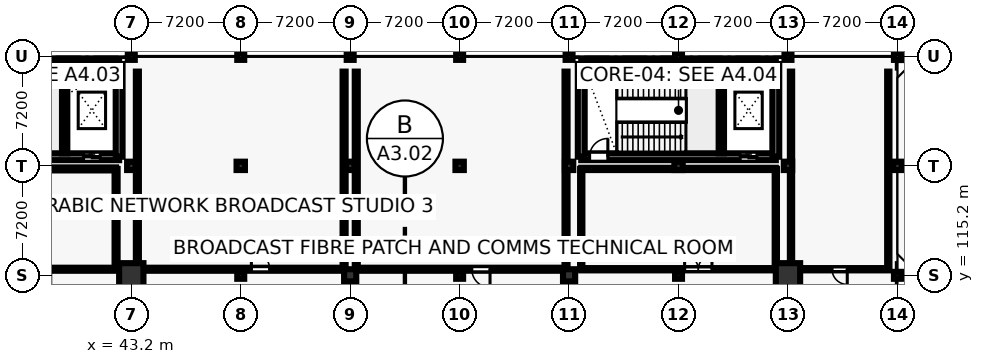
"""IFC4 building model, lengths in metres.
Left out: names, types, materials, properties, quantities, classifications, styles, units other than length and angle.
Written with IfcOpenShell. Run it as: python <this file> out.ifc"""

import sys

from ifc_helpers import new_model, si_unit, direction, frame, frame_2d, origin, origin_2d, place, context, subcontext, project, spatial, rectangle, circle, hollow_circle, extrude, element, fill, save


model = new_model("IFC4")
c1 = context("Model", 3, precision=1e-05, world=origin(), true_north=direction((0.0, 1.0)))
c2 = subcontext(c1, "Body", "Model", "MODEL_VIEW")
j1 = project(units=[si_unit("LENGTHUNIT", "METRE"), si_unit("PLANEANGLEUNIT", "RADIAN")], contexts=[c1])
p1 = place(None, origin())
s1 = spatial("IfcSite", under=j1, at=p1, CompositionType="ELEMENT")
p2 = place(p1, origin())
s2 = spatial("IfcBuilding", under=s1, at=p2, CompositionType="ELEMENT")
p3 = place(p2, frame((0.0, 0.0, 18.6)))
s3 = spatial("IfcBuildingStorey", under=s2, at=p3, CompositionType="ELEMENT", Elevation=18.6)
p4 = place(p3, frame((43.2, 115.2, 0.0), z_axis=(0.0, 0.0, 1.0), x_axis=(1.0, 0.0, 0.0)))
e1 = element("IfcColumn", 1, at=p4, inside=s3, PredefinedType="COLUMN", context=c2, shape_type="SweptSolid", body=[
    extrude(circle(Radius=0.8, at=origin_2d()), origin(), (0.0, 0.0, 1.0), 4.4),
])
p5 = place(p3, frame((43.2, 122.4, 0.0), z_axis=(0.0, 0.0, 1.0), x_axis=(1.0, 0.0, 0.0)))
e2 = element("IfcColumn", 2, at=p5, inside=s3, PredefinedType="COLUMN", context=c2, shape_type="SweptSolid", body=[
    extrude(rectangle(XDim=0.55, YDim=0.55, at=origin_2d()), origin(), (0.0, 0.0, 1.0), 4.4),
])
for number, where, z_axis, x_axis in (
    (3, (43.2, 129.6, 0.0), (0.0, 0.0, 1.0), (1.0, 0.0, 0.0)),
    (4, (50.4, 115.2, 0.0), (0.0, 0.0, 1.0), (1.0, 0.0, 0.0)),
):
    element("IfcColumn", number, at=place(p3, frame(where, z_axis=z_axis, x_axis=x_axis)), inside=s3, PredefinedType="COLUMN", context=c2, shape_type="SweptSolid", body=[
        extrude(hollow_circle(Radius=0.229, WallThickness=0.02, at=origin_2d()), origin(), (0.0, 0.0, 1.0), 4.4),
    ])
p6 = place(p3, frame((50.4, 122.4, 0.0), z_axis=(0.0, 0.0, 1.0), x_axis=(1.0, 0.0, 0.0)))
e5 = element("IfcColumn", 5, at=p6, inside=s3, PredefinedType="COLUMN", context=c2, shape_type="SweptSolid", body=[
    extrude(rectangle(XDim=0.55, YDim=0.55, at=origin_2d()), origin(), (0.0, 0.0, 1.0), 4.4),
])
p7 = place(p3, frame((50.4, 129.6, 0.0), z_axis=(0.0, 0.0, 1.0), x_axis=(1.0, 0.0, 0.0)))
e6 = element("IfcColumn", 6, at=p7, inside=s3, PredefinedType="COLUMN", context=c2, shape_type="SweptSolid", body=[
    extrude(hollow_circle(Radius=0.229, WallThickness=0.02, at=origin_2d()), origin(), (0.0, 0.0, 1.0), 4.4),
])
p8 = place(p3, frame((57.6, 115.2, 0.0), z_axis=(0.0, 0.0, 1.0), x_axis=(1.0, 0.0, 0.0)))
e7 = element("IfcColumn", 7, at=p8, inside=s3, PredefinedType="COLUMN", context=c2, shape_type="SweptSolid", body=[
    extrude(circle(Radius=0.4, at=origin_2d()), origin(), (0.0, 0.0, 1.0), 4.4),
])
p9 = place(p3, frame((57.6, 122.4, 0.0), z_axis=(0.0, 0.0, 1.0), x_axis=(1.0, 0.0, 0.0)))
e8 = element("IfcColumn", 8, at=p9, inside=s3, PredefinedType="COLUMN", context=c2, shape_type="SweptSolid", body=[
    extrude(rectangle(XDim=0.55, YDim=0.55, at=origin_2d()), origin(), (0.0, 0.0, 1.0), 4.4),
])
for number, where, z_axis, x_axis in (
    (9, (57.6, 129.6, 0.0), (0.0, 0.0, 1.0), (1.0, 0.0, 0.0)),
    (10, (64.8, 115.2, 0.0), (0.0, 0.0, 1.0), (1.0, 0.0, 0.0)),
):
    element("IfcColumn", number, at=place(p3, frame(where, z_axis=z_axis, x_axis=x_axis)), inside=s3, PredefinedType="COLUMN", context=c2, shape_type="SweptSolid", body=[
        extrude(hollow_circle(Radius=0.229, WallThickness=0.02, at=origin_2d()), origin(), (0.0, 0.0, 1.0), 4.4),
    ])
p10 = place(p3, frame((64.8, 122.4, 0.0), z_axis=(0.0, 0.0, 1.0), x_axis=(1.0, 0.0, 0.0)))
e11 = element("IfcColumn", 11, at=p10, inside=s3, PredefinedType="COLUMN", context=c2, shape_type="SweptSolid", body=[
    extrude(rectangle(XDim=0.55, YDim=0.55, at=origin_2d()), origin(), (0.0, 0.0, 1.0), 4.4),
])
p11 = place(p3, frame((64.8, 129.6, 0.0), z_axis=(0.0, 0.0, 1.0), x_axis=(1.0, 0.0, 0.0)))
e12 = element("IfcColumn", 12, at=p11, inside=s3, PredefinedType="COLUMN", context=c2, shape_type="SweptSolid", body=[
    extrude(hollow_circle(Radius=0.229, WallThickness=0.02, at=origin_2d()), origin(), (0.0, 0.0, 1.0), 4.4),
])
p12 = place(p3, frame((72.0, 115.2, 0.0), z_axis=(0.0, 0.0, 1.0), x_axis=(1.0, 0.0, 0.0)))
e13 = element("IfcColumn", 13, at=p12, inside=s3, PredefinedType="COLUMN", context=c2, shape_type="SweptSolid", body=[
    extrude(circle(Radius=0.4, at=origin_2d()), origin(), (0.0, 0.0, 1.0), 4.4),
])
p13 = place(p3, frame((72.0, 122.4, 0.0), z_axis=(0.0, 0.0, 1.0), x_axis=(1.0, 0.0, 0.0)))
e14 = element("IfcColumn", 14, at=p13, inside=s3, PredefinedType="COLUMN", context=c2, shape_type="SweptSolid", body=[
    extrude(rectangle(XDim=0.55, YDim=0.55, at=origin_2d()), origin(), (0.0, 0.0, 1.0), 4.4),
])
for number, where, z_axis, x_axis in (
    (15, (72.0, 129.6, 0.0), (0.0, 0.0, 1.0), (1.0, 0.0, 0.0)),
    (16, (79.2, 115.2, 0.0), (0.0, 0.0, 1.0), (1.0, 0.0, 0.0)),
):
    element("IfcColumn", number, at=place(p3, frame(where, z_axis=z_axis, x_axis=x_axis)), inside=s3, PredefinedType="COLUMN", context=c2, shape_type="SweptSolid", body=[
        extrude(hollow_circle(Radius=0.229, WallThickness=0.02, at=origin_2d()), origin(), (0.0, 0.0, 1.0), 4.4),
    ])
p14 = place(p3, frame((79.2, 122.4, 0.0), z_axis=(0.0, 0.0, 1.0), x_axis=(1.0, 0.0, 0.0)))
e17 = element("IfcColumn", 17, at=p14, inside=s3, PredefinedType="COLUMN", context=c2, shape_type="SweptSolid", body=[
    extrude(rectangle(XDim=0.55, YDim=0.55, at=origin_2d()), origin(), (0.0, 0.0, 1.0), 4.4),
])
p15 = place(p3, frame((79.2, 129.6, 0.0), z_axis=(0.0, 0.0, 1.0), x_axis=(1.0, 0.0, 0.0)))
e18 = element("IfcColumn", 18, at=p15, inside=s3, PredefinedType="COLUMN", context=c2, shape_type="SweptSolid", body=[
    extrude(hollow_circle(Radius=0.229, WallThickness=0.02, at=origin_2d()), origin(), (0.0, 0.0, 1.0), 4.4),
])
p16 = place(p3, frame((86.4, 115.2, 0.0), z_axis=(0.0, 0.0, 1.0), x_axis=(1.0, 0.0, 0.0)))
e19 = element("IfcColumn", 19, at=p16, inside=s3, PredefinedType="COLUMN", context=c2, shape_type="SweptSolid", body=[
    extrude(circle(Radius=0.8, at=origin_2d()), origin(), (0.0, 0.0, 1.0), 4.4),
])
p17 = place(p3, frame((86.4, 122.4, 0.0), z_axis=(0.0, 0.0, 1.0), x_axis=(1.0, 0.0, 0.0)))
e20 = element("IfcColumn", 20, at=p17, inside=s3, PredefinedType="COLUMN", context=c2, shape_type="SweptSolid", body=[
    extrude(rectangle(XDim=0.55, YDim=0.55, at=origin_2d()), origin(), (0.0, 0.0, 1.0), 4.4),
])
for number, where, z_axis, x_axis in (
    (21, (86.4, 129.6, 0.0), (0.0, 0.0, 1.0), (1.0, 0.0, 0.0)),
    (22, (93.6, 115.2, 0.0), (0.0, 0.0, 1.0), (1.0, 0.0, 0.0)),
):
    element("IfcColumn", number, at=place(p3, frame(where, z_axis=z_axis, x_axis=x_axis)), inside=s3, PredefinedType="COLUMN", context=c2, shape_type="SweptSolid", body=[
        extrude(hollow_circle(Radius=0.229, WallThickness=0.02, at=origin_2d()), origin(), (0.0, 0.0, 1.0), 4.4),
    ])
p18 = place(p3, frame((93.6, 122.4, 0.0), z_axis=(0.0, 0.0, 1.0), x_axis=(1.0, 0.0, 0.0)))
e23 = element("IfcColumn", 23, at=p18, inside=s3, PredefinedType="COLUMN", context=c2, shape_type="SweptSolid", body=[
    extrude(rectangle(XDim=0.55, YDim=0.55, at=origin_2d()), origin(), (0.0, 0.0, 1.0), 4.4),
])
p19 = place(p3, frame((93.6, 129.6, 0.0), z_axis=(0.0, 0.0, 1.0), x_axis=(1.0, 0.0, 0.0)))
e24 = element("IfcColumn", 24, at=p19, inside=s3, PredefinedType="COLUMN", context=c2, shape_type="SweptSolid", body=[
    extrude(hollow_circle(Radius=0.229, WallThickness=0.02, at=origin_2d()), origin(), (0.0, 0.0, 1.0), 4.4),
])
p20 = place(p3, frame((29.6, 123.0, 0.0), z_axis=(0.0, 0.0, 1.0), x_axis=(1.0, 0.0, 0.0)))
e25 = element("IfcWall", 25, at=p20, inside=s3, PredefinedType="SHEAR", context=c2, shape_type="SweptSolid", body=[
    extrude(rectangle(XDim=12.8, YDim=0.45, at=frame_2d((6.4, 0.0))), origin(), (0.0, 0.0, 1.0), 4.15),
])
p21 = place(p20, frame((0.55, 0.0, 0.0)))
e26 = element("IfcOpeningElement", 26, at=p21, cuts=e25, PredefinedType="OPENING", context=c2, shape_type="SweptSolid", body=[
    extrude(rectangle(XDim=1.2, YDim=2.25, at=frame_2d((0.6, 1.125))), frame((0.0, 0.235, 0.0), z_axis=(0.0, -1.0, 0.0), x_axis=(1.0, 0.0, 0.0)), (0.0, 0.0, 1.0), 0.47),
])
p22 = place(p20, frame((10.458, 0.0, 0.0)))
e27 = element("IfcOpeningElement", 27, at=p22, cuts=e25, PredefinedType="OPENING", context=c2, shape_type="SweptSolid", body=[
    extrude(rectangle(XDim=1.1, YDim=2.2, at=frame_2d((0.55, 1.1))), frame((0.0, 0.235, 0.0), z_axis=(0.0, -1.0, 0.0), x_axis=(1.0, 0.0, 0.0)), (0.0, 0.0, 1.0), 0.47),
])
p23 = place(p3, frame((29.6, 129.1, 0.0), z_axis=(0.0, 0.0, 1.0), x_axis=(1.0, 0.0, 0.0)))
e28 = element("IfcWall", 28, at=p23, inside=s3, PredefinedType="SHEAR", context=c2, shape_type="SweptSolid", body=[
    extrude(rectangle(XDim=12.8, YDim=0.45, at=frame_2d((6.4, 0.0))), origin(), (0.0, 0.0, 1.0), 4.15),
])
p24 = place(p3, frame((42.4, 123.0, 0.0), z_axis=(0.0, 0.0, 1.0), x_axis=(0.0, 1.0, 0.0)))
e29 = element("IfcWall", 29, at=p24, inside=s3, PredefinedType="SHEAR", context=c2, shape_type="SweptSolid", body=[
    extrude(rectangle(XDim=6.1, YDim=0.45, at=frame_2d((3.05, 0.0))), origin(), (0.0, 0.0, 1.0), 4.15),
])
p25 = place(p3, frame((38.816, 123.225, 0.0), z_axis=(0.0, 0.0, 1.0), x_axis=(0.0, 1.0, 0.0)))
e30 = element("IfcWall", 30, at=p25, inside=s3, PredefinedType="SHEAR", context=c2, shape_type="SweptSolid", body=[
    extrude(rectangle(XDim=5.65, YDim=0.35, at=frame_2d((2.825, 0.0))), origin(), (0.0, 0.0, 1.0), 4.15),
])
p26 = place(p3, frame((72.8, 123.0, 0.0), z_axis=(0.0, 0.0, 1.0), x_axis=(1.0, 0.0, 0.0)))
e31 = element("IfcWall", 31, at=p26, inside=s3, PredefinedType="SHEAR", context=c2, shape_type="SweptSolid", body=[
    extrude(rectangle(XDim=12.8, YDim=0.45, at=frame_2d((6.4, 0.0))), origin(), (0.0, 0.0, 1.0), 4.15),
])
p27 = place(p26, frame((0.55, 0.0, 0.0)))
e32 = element("IfcOpeningElement", 32, at=p27, cuts=e31, PredefinedType="OPENING", context=c2, shape_type="SweptSolid", body=[
    extrude(rectangle(XDim=1.2, YDim=2.25, at=frame_2d((0.6, 1.125))), frame((0.0, 0.235, 0.0), z_axis=(0.0, -1.0, 0.0), x_axis=(1.0, 0.0, 0.0)), (0.0, 0.0, 1.0), 0.47),
])
p28 = place(p26, frame((10.458, 0.0, 0.0)))
e33 = element("IfcOpeningElement", 33, at=p28, cuts=e31, PredefinedType="OPENING", context=c2, shape_type="SweptSolid", body=[
    extrude(rectangle(XDim=1.1, YDim=2.2, at=frame_2d((0.55, 1.1))), frame((0.0, 0.235, 0.0), z_axis=(0.0, -1.0, 0.0), x_axis=(1.0, 0.0, 0.0)), (0.0, 0.0, 1.0), 0.47),
])
p29 = place(p3, frame((72.8, 129.1, 0.0), z_axis=(0.0, 0.0, 1.0), x_axis=(1.0, 0.0, 0.0)))
e34 = element("IfcWall", 34, at=p29, inside=s3, PredefinedType="SHEAR", context=c2, shape_type="SweptSolid", body=[
    extrude(rectangle(XDim=12.8, YDim=0.45, at=frame_2d((6.4, 0.0))), origin(), (0.0, 0.0, 1.0), 4.15),
])
for number, where, z_axis, x_axis in (
    (35, (72.8, 123.0, 0.0), (0.0, 0.0, 1.0), (0.0, 1.0, 0.0)),
    (36, (85.6, 123.0, 0.0), (0.0, 0.0, 1.0), (0.0, 1.0, 0.0)),
):
    element("IfcWall", number, at=place(p3, frame(where, z_axis=z_axis, x_axis=x_axis)), inside=s3, PredefinedType="SHEAR", context=c2, shape_type="SweptSolid", body=[
        extrude(rectangle(XDim=6.1, YDim=0.45, at=frame_2d((3.05, 0.0))), origin(), (0.0, 0.0, 1.0), 4.15),
    ])
p30 = place(p3, frame((82.016, 123.225, 0.0), z_axis=(0.0, 0.0, 1.0), x_axis=(0.0, 1.0, 0.0)))
e37 = element("IfcWall", 37, at=p30, inside=s3, PredefinedType="SHEAR", context=c2, shape_type="SweptSolid", body=[
    extrude(rectangle(XDim=5.65, YDim=0.35, at=frame_2d((2.825, 0.0))), origin(), (0.0, 0.0, 1.0), 4.15),
])
p31 = place(p3, frame((93.95, 115.2, 0.0), z_axis=(0.0, 0.0, 1.0), x_axis=(1.0, 0.0, 0.0)))
e38 = element("IfcWall", 38, at=p31, inside=s3, PredefinedType="SOLIDWALL", context=c2, shape_type="SweptSolid", body=[
    extrude(rectangle(XDim=13.7, YDim=0.32, at=frame_2d((6.85, 0.0))), origin(), (0.0, 0.0, 1.0), 3.21),
])
p32 = place(p3, frame((93.75, 129.45, 0.0), z_axis=(0.0, 0.0, 1.0), x_axis=(1.0, 0.0, 0.0)))
e39 = element("IfcWall", 39, at=p32, inside=s3, PredefinedType="PARAPET", context=c2, shape_type="SweptSolid", body=[
    extrude(rectangle(XDim=28.5, YDim=0.18, at=frame_2d((14.25, 0.0))), origin(), (0.0, 0.0, 1.0), 1.15),
])
p33 = place(p3, frame((29.8, 115.6, 0.0), z_axis=(0.0, 0.0, 1.0), x_axis=(1.0, 0.0, 0.0)))
e40 = element("IfcWall", 40, at=p33, inside=s3, PredefinedType="PARTITIONING", context=c2, shape_type="SweptSolid", body=[
    extrude(rectangle(XDim=12.4, YDim=0.2, at=frame_2d((6.2, 0.0))), origin(), (0.0, 0.0, 1.0), 3.21),
])
p34 = place(p33, frame((6.9, 0.0, 0.0)))
e41 = element("IfcOpeningElement", 41, at=p34, cuts=e40, PredefinedType="OPENING", context=c2, shape_type="SweptSolid", body=[
    extrude(rectangle(XDim=1.2, YDim=2.25, at=frame_2d((0.6, 1.125))), frame((0.0, 0.11, 0.0), z_axis=(0.0, -1.0, 0.0), x_axis=(1.0, 0.0, 0.0)), (0.0, 0.0, 1.0), 0.22),
])
p35 = place(p3, frame((42.2, 115.6, 0.0), z_axis=(0.0, 0.0, 1.0), x_axis=(0.0, 1.0, 0.0)))
e42 = element("IfcWall", 42, at=p35, inside=s3, PredefinedType="PARTITIONING", context=c2, shape_type="SweptSolid", body=[
    extrude(rectangle(XDim=6.6, YDim=0.2, at=frame_2d((3.3, 0.0))), origin(), (0.0, 0.0, 1.0), 3.21),
])
p36 = place(p3, frame((42.2, 122.2, 0.0), z_axis=(0.0, 0.0, 1.0), x_axis=(-1.0, 0.0, 0.0)))
e43 = element("IfcWall", 43, at=p36, inside=s3, PredefinedType="PARTITIONING", context=c2, shape_type="SweptSolid", body=[
    extrude(rectangle(XDim=12.4, YDim=0.2, at=frame_2d((6.2, 0.0))), origin(), (0.0, 0.0, 1.0), 3.21),
])
p37 = place(p3, frame((43.6, 115.6, 0.0), z_axis=(0.0, 0.0, 1.0), x_axis=(1.0, 0.0, 0.0)))
e44 = element("IfcWall", 44, at=p37, inside=s3, PredefinedType="PARTITIONING", context=c2, shape_type="SweptSolid", body=[
    extrude(rectangle(XDim=13.6, YDim=0.2, at=frame_2d((6.8, 0.0))), origin(), (0.0, 0.0, 1.0), 3.21),
])
p38 = place(p37, frame((7.5, 0.0, 0.0)))
e45 = element("IfcOpeningElement", 45, at=p38, cuts=e44, PredefinedType="OPENING", context=c2, shape_type="SweptSolid", body=[
    extrude(rectangle(XDim=1.2, YDim=2.25, at=frame_2d((0.6, 1.125))), frame((0.0, 0.11, 0.0), z_axis=(0.0, -1.0, 0.0), x_axis=(1.0, 0.0, 0.0)), (0.0, 0.0, 1.0), 0.22),
])
for number, where, z_axis, x_axis in (
    (46, (57.2, 115.6, 0.0), (0.0, 0.0, 1.0), (0.0, 1.0, 0.0)),
    (47, (43.6, 128.6, 0.0), (0.0, 0.0, 1.0), (0.0, -1.0, 0.0)),
):
    element("IfcWall", number, at=place(p3, frame(where, z_axis=z_axis, x_axis=x_axis)), inside=s3, PredefinedType="PARTITIONING", context=c2, shape_type="SweptSolid", body=[
        extrude(rectangle(XDim=13.0, YDim=0.2, at=frame_2d((6.5, 0.0))), origin(), (0.0, 0.0, 1.0), 3.21),
    ])
p39 = place(p3, frame((58.0, 115.6, 0.0), z_axis=(0.0, 0.0, 1.0), x_axis=(1.0, 0.0, 0.0)))
e48 = element("IfcWall", 48, at=p39, inside=s3, PredefinedType="PARTITIONING", context=c2, shape_type="SweptSolid", body=[
    extrude(rectangle(XDim=13.8, YDim=0.2, at=frame_2d((6.9, 0.0))), origin(), (0.0, 0.0, 1.0), 3.21),
])
p40 = place(p39, frame((7.6, 0.0, 0.0)))
e49 = element("IfcOpeningElement", 49, at=p40, cuts=e48, PredefinedType="OPENING", context=c2, shape_type="SweptSolid", body=[
    extrude(rectangle(XDim=1.2, YDim=2.25, at=frame_2d((0.6, 1.125))), frame((0.0, 0.11, 0.0), z_axis=(0.0, -1.0, 0.0), x_axis=(1.0, 0.0, 0.0)), (0.0, 0.0, 1.0), 0.22),
])
for number, where, z_axis, x_axis in (
    (50, (71.8, 115.6, 0.0), (0.0, 0.0, 1.0), (0.0, 1.0, 0.0)),
    (51, (58.0, 128.6, 0.0), (0.0, 0.0, 1.0), (0.0, -1.0, 0.0)),
):
    element("IfcWall", number, at=place(p3, frame(where, z_axis=z_axis, x_axis=x_axis)), inside=s3, PredefinedType="PARTITIONING", context=c2, shape_type="SweptSolid", body=[
        extrude(rectangle(XDim=13.0, YDim=0.2, at=frame_2d((6.5, 0.0))), origin(), (0.0, 0.0, 1.0), 3.21),
    ])
p41 = place(p3, frame((72.8, 115.6, 0.0), z_axis=(0.0, 0.0, 1.0), x_axis=(1.0, 0.0, 0.0)))
e52 = element("IfcWall", 52, at=p41, inside=s3, PredefinedType="PARTITIONING", context=c2, shape_type="SweptSolid", body=[
    extrude(rectangle(XDim=12.8, YDim=0.15, at=frame_2d((6.4, 0.0))), origin(), (0.0, 0.0, 1.0), 3.21),
])
p42 = place(p41, frame((6.8, 0.0, 0.0)))
e53 = element("IfcOpeningElement", 53, at=p42, cuts=e52, PredefinedType="OPENING", context=c2, shape_type="SweptSolid", body=[
    extrude(rectangle(XDim=1.8, YDim=2.3, at=frame_2d((0.9, 1.15))), frame((0.0, 0.085, 0.0), z_axis=(0.0, -1.0, 0.0), x_axis=(1.0, 0.0, 0.0)), (0.0, 0.0, 1.0), 0.17),
])
p43 = place(p3, frame((85.6, 115.6, 0.0), z_axis=(0.0, 0.0, 1.0), x_axis=(0.0, 1.0, 0.0)))
e54 = element("IfcWall", 54, at=p43, inside=s3, PredefinedType="PARTITIONING", context=c2, shape_type="SweptSolid", body=[
    extrude(rectangle(XDim=6.6, YDim=0.15, at=frame_2d((3.3, 0.0))), origin(), (0.0, 0.0, 1.0), 3.21),
])
p44 = place(p3, frame((85.6, 122.2, 0.0), z_axis=(0.0, 0.0, 1.0), x_axis=(-1.0, 0.0, 0.0)))
e55 = element("IfcWall", 55, at=p44, inside=s3, PredefinedType="PARTITIONING", context=c2, shape_type="SweptSolid", body=[
    extrude(rectangle(XDim=12.8, YDim=0.15, at=frame_2d((6.4, 0.0))), origin(), (0.0, 0.0, 1.0), 3.21),
])
p45 = place(p3, frame((72.8, 122.2, 0.0), z_axis=(0.0, 0.0, 1.0), x_axis=(0.0, -1.0, 0.0)))
e56 = element("IfcWall", 56, at=p45, inside=s3, PredefinedType="PARTITIONING", context=c2, shape_type="SweptSolid", body=[
    extrude(rectangle(XDim=6.6, YDim=0.15, at=frame_2d((3.3, 0.0))), origin(), (0.0, 0.0, 1.0), 3.21),
])
p46 = place(p3, frame((86.6, 115.6, 0.0), z_axis=(0.0, 0.0, 1.0), x_axis=(1.0, 0.0, 0.0)))
e57 = element("IfcWall", 57, at=p46, inside=s3, PredefinedType="PARTITIONING", context=c2, shape_type="SweptSolid", body=[
    extrude(rectangle(XDim=6.4, YDim=0.15, at=frame_2d((3.2, 0.0))), origin(), (0.0, 0.0, 1.0), 3.21),
])
p47 = place(p46, frame((2.7, 0.0, 0.0)))
e58 = element("IfcOpeningElement", 58, at=p47, cuts=e57, PredefinedType="OPENING", context=c2, shape_type="SweptSolid", body=[
    extrude(rectangle(XDim=1.0, YDim=2.2, at=frame_2d((0.5, 1.1))), frame((0.0, 0.085, 0.0), z_axis=(0.0, -1.0, 0.0), x_axis=(1.0, 0.0, 0.0)), (0.0, 0.0, 1.0), 0.17),
])
for number, where, z_axis, x_axis in (
    (59, (93.0, 115.6, 0.0), (0.0, 0.0, 1.0), (0.0, 1.0, 0.0)),
    (60, (86.6, 128.6, 0.0), (0.0, 0.0, 1.0), (0.0, -1.0, 0.0)),
):
    element("IfcWall", number, at=place(p3, frame(where, z_axis=z_axis, x_axis=x_axis)), inside=s3, PredefinedType="PARTITIONING", context=c2, shape_type="SweptSolid", body=[
        extrude(rectangle(XDim=13.0, YDim=0.15, at=frame_2d((6.5, 0.0))), origin(), (0.0, 0.0, 1.0), 3.21),
    ])
p48 = place(p22, origin())
e61 = element("IfcDoor", 61, at=p48, inside=s3, OperationType="SLIDING_TO_RIGHT", PredefinedType="DOOR", context=c2, shape_type="SweptSolid", body=[
    extrude(rectangle(XDim=1.1, YDim=2.2, at=frame_2d((0.55, 1.1))), frame((0.0, 0.025, 0.0), z_axis=(0.0, -1.0, 0.0), x_axis=(1.0, 0.0, 0.0)), (0.0, 0.0, 1.0), 0.05),
])
fill(e27, e61)
p49 = place(p27, origin())
e62 = element("IfcDoor", 62, at=p49, inside=s3, OperationType="SINGLE_SWING_RIGHT", PredefinedType="DOOR", context=c2, shape_type="SweptSolid", body=[
    extrude(rectangle(XDim=1.2, YDim=2.25, at=frame_2d((0.6, 1.125))), frame((0.0, 0.025, 0.0), z_axis=(0.0, -1.0, 0.0), x_axis=(1.0, 0.0, 0.0)), (0.0, 0.0, 1.0), 0.05),
])
fill(e32, e62)
p50 = place(p28, origin())
e63 = element("IfcDoor", 63, at=p50, inside=s3, OperationType="SLIDING_TO_RIGHT", PredefinedType="DOOR", context=c2, shape_type="SweptSolid", body=[
    extrude(rectangle(XDim=1.1, YDim=2.2, at=frame_2d((0.55, 1.1))), frame((0.0, 0.025, 0.0), z_axis=(0.0, -1.0, 0.0), x_axis=(1.0, 0.0, 0.0)), (0.0, 0.0, 1.0), 0.05),
])
fill(e33, e63)
p51 = place(p38, origin())
e64 = element("IfcDoor", 64, at=p51, inside=s3, OperationType="SINGLE_SWING_LEFT", PredefinedType="DOOR", context=c2, shape_type="SweptSolid", body=[
    extrude(rectangle(XDim=1.2, YDim=2.25, at=frame_2d((0.6, 1.125))), frame((0.0, 0.025, 0.0), z_axis=(0.0, -1.0, 0.0), x_axis=(1.0, 0.0, 0.0)), (0.0, 0.0, 1.0), 0.05),
])
fill(e45, e64)
p52 = place(p40, frame((1.2, 0.0, 0.0), z_axis=(0.0, 0.0, 1.0), x_axis=(-1.0, 0.0, 0.0)))
e65 = element("IfcDoor", 65, at=p52, inside=s3, OperationType="SINGLE_SWING_RIGHT", PredefinedType="DOOR", context=c2, shape_type="SweptSolid", body=[
    extrude(rectangle(XDim=1.2, YDim=2.25, at=frame_2d((0.6, 1.125))), frame((0.0, 0.025, 0.0), z_axis=(0.0, -1.0, 0.0), x_axis=(1.0, 0.0, 0.0)), (0.0, 0.0, 1.0), 0.05),
])
fill(e49, e65)
p53 = place(p42, origin())
e66 = element("IfcDoor", 66, at=p53, inside=s3, OperationType="DOUBLE_DOOR_SINGLE_SWING", PredefinedType="DOOR", context=c2, shape_type="SweptSolid", body=[
    extrude(rectangle(XDim=1.8, YDim=2.3, at=frame_2d((0.9, 1.15))), frame((0.0, 0.025, 0.0), z_axis=(0.0, -1.0, 0.0), x_axis=(1.0, 0.0, 0.0)), (0.0, 0.0, 1.0), 0.05),
])
fill(e53, e66)
p54 = place(p47, frame((1.0, 0.0, 0.0), z_axis=(0.0, 0.0, 1.0), x_axis=(-1.0, 0.0, 0.0)))
e67 = element("IfcDoor", 67, at=p54, inside=s3, OperationType="SINGLE_SWING_RIGHT", PredefinedType="DOOR", context=c2, shape_type="SweptSolid", body=[
    extrude(rectangle(XDim=1.0, YDim=2.2, at=frame_2d((0.5, 1.1))), frame((0.0, 0.025, 0.0), z_axis=(0.0, -1.0, 0.0), x_axis=(1.0, 0.0, 0.0)), (0.0, 0.0, 1.0), 0.05),
])
fill(e58, e67)
save(model, sys.argv[1])
